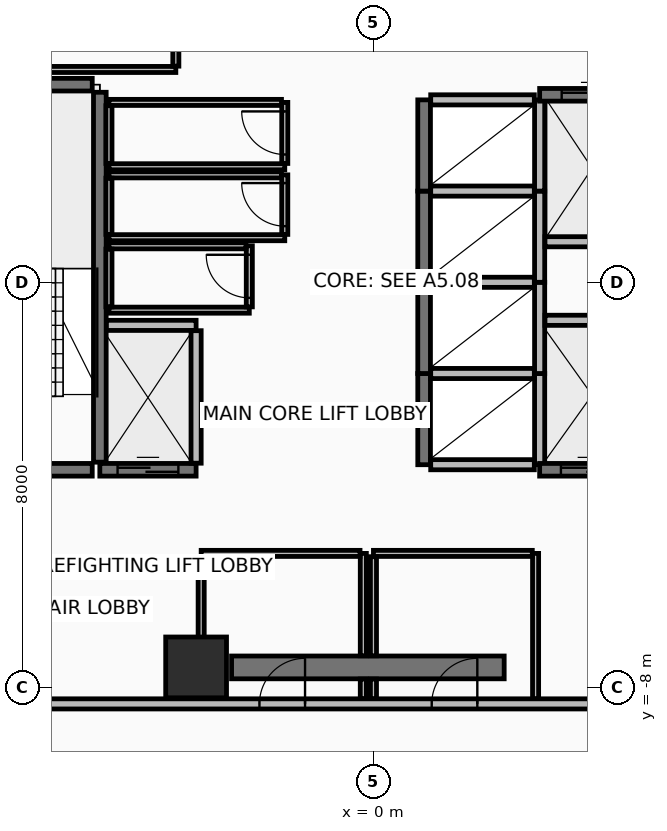
"""IFC4 building model, lengths in metres.
Left out: names, types, materials, properties, quantities, classifications, styles, units other than length and angle.
Written with IfcOpenShell. Run it as: python <this file> out.ifc"""

import sys

from ifc_helpers import new_model, si_unit, direction, frame, frame_2d, origin, origin_2d, place, context, subcontext, project, spatial, rectangle, extrude, element, fill, save


model = new_model("IFC4")
c1 = context("Model", 3, precision=1e-05, world=origin(), true_north=direction((0.0, 1.0)))
c2 = subcontext(c1, "Body", "Model", "MODEL_VIEW")
j1 = project(units=[si_unit("LENGTHUNIT", "METRE"), si_unit("PLANEANGLEUNIT", "RADIAN")], contexts=[c1])
p1 = place(None, origin())
s1 = spatial("IfcSite", under=j1, at=p1, CompositionType="ELEMENT")
p2 = place(p1, origin())
s2 = spatial("IfcBuilding", under=s1, at=p2, CompositionType="ELEMENT")
p3 = place(p2, frame((0.0, 0.0, 149.6)))
s3 = spatial("IfcBuildingStorey", under=s2, at=p3, CompositionType="ELEMENT", Elevation=149.6)
p4 = place(p3, frame((-3.5, -7.6, 0.0), z_axis=(0.0, 0.0, 1.0), x_axis=(1.0, 0.0, 0.0)))
e1 = element("IfcColumn", 1, at=p4, inside=s3, PredefinedType="COLUMN", context=c2, shape_type="SweptSolid", body=[
    extrude(rectangle(XDim=1.2, YDim=1.2, at=origin_2d()), origin(), (0.0, 0.0, 1.0), 3.6),
])
p5 = place(p3, frame((-2.8, -7.6, 0.0), z_axis=(0.0, 0.0, 1.0), x_axis=(1.0, 0.0, 0.0)))
e2 = element("IfcWall", 2, at=p5, inside=s3, PredefinedType="SHEAR", context=c2, shape_type="SweptSolid", body=[
    extrude(rectangle(XDim=5.38, YDim=0.45, at=frame_2d((2.69, 0.0))), origin(), (0.0, 0.0, 1.0), 3.41),
])
p6 = place(p3, frame((-9.62, -8.32, 0.0), z_axis=(0.0, 0.0, 1.0), x_axis=(1.0, 0.0, 0.0)))
e3 = element("IfcWall", 3, at=p6, inside=s3, PredefinedType="PARTITIONING", context=c2, shape_type="SweptSolid", body=[
    extrude(rectangle(XDim=19.24, YDim=0.2, at=frame_2d((9.62, 0.0))), origin(), (0.0, 0.0, 1.0), 2.855),
])
p7 = place(p6, frame((7.37, 0.0, 0.0)))
e4 = element("IfcOpeningElement", 4, at=p7, cuts=e3, PredefinedType="OPENING", context=c2, shape_type="SweptSolid", body=[
    extrude(rectangle(XDim=0.9, YDim=2.1, at=frame_2d((0.45, 1.05))), frame((0.0, 0.11, 0.0), z_axis=(0.0, -1.0, 0.0), x_axis=(1.0, 0.0, 0.0)), (0.0, 0.0, 1.0), 0.22),
])
p8 = place(p6, frame((10.77, 0.0, 0.0)))
e5 = element("IfcOpeningElement", 5, at=p8, cuts=e3, PredefinedType="OPENING", context=c2, shape_type="SweptSolid", body=[
    extrude(rectangle(XDim=0.9, YDim=2.1, at=frame_2d((0.45, 1.05))), frame((0.0, 0.11, 0.0), z_axis=(0.0, -1.0, 0.0), x_axis=(1.0, 0.0, 0.0)), (0.0, 0.0, 1.0), 0.22),
])
p9 = place(p3, frame((-5.4, -3.55, 0.0), z_axis=(0.0, 0.0, 1.0), x_axis=(0.0, 1.0, 0.0)))
e6 = element("IfcWall", 6, at=p9, inside=s3, PredefinedType="SHEAR", context=c2, shape_type="SweptSolid", body=[
    extrude(rectangle(XDim=7.3, YDim=0.25, at=frame_2d((3.65, 0.0))), origin(), (0.0, 0.0, 1.0), 3.41),
])
p10 = place(p3, frame((-8.5, -3.7, 0.0), z_axis=(0.0, 0.0, 1.0), x_axis=(1.0, 0.0, 0.0)))
e7 = element("IfcWall", 7, at=p10, inside=s3, PredefinedType="SHEAR", context=c2, shape_type="SweptSolid", body=[
    extrude(rectangle(XDim=2.95, YDim=0.25, at=frame_2d((1.475, 0.0))), origin(), (0.0, 0.0, 1.0), 3.41),
])
p11 = place(p10, frame((0.9, 0.0, 0.0)))
e8 = element("IfcOpeningElement", 8, at=p11, cuts=e7, PredefinedType="OPENING", context=c2, shape_type="SweptSolid", body=[
    extrude(rectangle(XDim=1.1, YDim=2.15, at=frame_2d((0.55, 1.075))), frame((0.0, 0.135, 0.0), z_axis=(0.0, -1.0, 0.0), x_axis=(1.0, 0.0, 0.0)), (0.0, 0.0, 1.0), 0.27),
])
p12 = place(p3, frame((-8.5, 3.9, 0.0), z_axis=(0.0, 0.0, 1.0), x_axis=(1.0, 0.0, 0.0)))
e9 = element("IfcWall", 9, at=p12, inside=s3, PredefinedType="SHEAR", context=c2, shape_type="SweptSolid", body=[
    extrude(rectangle(XDim=2.95, YDim=0.25, at=frame_2d((1.475, 0.0))), origin(), (0.0, 0.0, 1.0), 3.41),
])
p13 = place(p3, frame((1.0, -3.6, 0.0), z_axis=(0.0, 0.0, 1.0), x_axis=(0.0, 1.0, 0.0)))
e10 = element("IfcWall", 10, at=p13, inside=s3, PredefinedType="SHEAR", context=c2, shape_type="SweptSolid", body=[
    extrude(rectangle(XDim=1.8, YDim=0.25, at=frame_2d((0.9, 0.0))), origin(), (0.0, 0.0, 1.0), 3.41),
])
p14 = place(p3, frame((3.28, -3.6, 0.0), z_axis=(0.0, 0.0, 1.0), x_axis=(0.0, 1.0, 0.0)))
e11 = element("IfcWall", 11, at=p14, inside=s3, PredefinedType="PARTITIONING", context=c2, shape_type="SweptSolid", body=[
    extrude(rectangle(XDim=1.8, YDim=0.2, at=frame_2d((0.9, 0.0))), origin(), (0.0, 0.0, 1.0), 3.41),
])
for number, where, z_axis, x_axis in (
    (12, (1.13, -3.6, 0.0), (0.0, 0.0, 1.0), (1.0, 0.0, 0.0)),
    (13, (1.13, -1.8, 0.0), (0.0, 0.0, 1.0), (1.0, 0.0, 0.0)),
):
    element("IfcWall", number, at=place(p3, frame(where, z_axis=z_axis, x_axis=x_axis)), inside=s3, PredefinedType="PARTITIONING", context=c2, shape_type="SweptSolid", body=[
        extrude(rectangle(XDim=2.045, YDim=0.2, at=frame_2d((1.022, 0.0))), origin(), (0.0, 0.0, 1.0), 3.41),
    ])
p15 = place(p3, frame((1.0, -1.8, 0.0), z_axis=(0.0, 0.0, 1.0), x_axis=(0.0, 1.0, 0.0)))
e14 = element("IfcWall", 14, at=p15, inside=s3, PredefinedType="SHEAR", context=c2, shape_type="SweptSolid", body=[
    extrude(rectangle(XDim=1.8, YDim=0.25, at=frame_2d((0.9, 0.0))), origin(), (0.0, 0.0, 1.0), 3.41),
])
p16 = place(p3, frame((3.28, -1.8, 0.0), z_axis=(0.0, 0.0, 1.0), x_axis=(0.0, 1.0, 0.0)))
e15 = element("IfcWall", 15, at=p16, inside=s3, PredefinedType="PARTITIONING", context=c2, shape_type="SweptSolid", body=[
    extrude(rectangle(XDim=1.8, YDim=0.2, at=frame_2d((0.9, 0.0))), origin(), (0.0, 0.0, 1.0), 3.41),
])
p17 = place(p3, frame((1.13, 0.0, 0.0), z_axis=(0.0, 0.0, 1.0), x_axis=(1.0, 0.0, 0.0)))
e16 = element("IfcWall", 16, at=p17, inside=s3, PredefinedType="PARTITIONING", context=c2, shape_type="SweptSolid", body=[
    extrude(rectangle(XDim=2.045, YDim=0.2, at=frame_2d((1.022, 0.0))), origin(), (0.0, 0.0, 1.0), 3.41),
])
p18 = place(p3, frame((1.0, 0.0, 0.0), z_axis=(0.0, 0.0, 1.0), x_axis=(0.0, 1.0, 0.0)))
e17 = element("IfcWall", 17, at=p18, inside=s3, PredefinedType="SHEAR", context=c2, shape_type="SweptSolid", body=[
    extrude(rectangle(XDim=1.8, YDim=0.25, at=frame_2d((0.9, 0.0))), origin(), (0.0, 0.0, 1.0), 3.41),
])
p19 = place(p3, frame((3.28, 0.0, 0.0), z_axis=(0.0, 0.0, 1.0), x_axis=(0.0, 1.0, 0.0)))
e18 = element("IfcWall", 18, at=p19, inside=s3, PredefinedType="PARTITIONING", context=c2, shape_type="SweptSolid", body=[
    extrude(rectangle(XDim=1.8, YDim=0.2, at=frame_2d((0.9, 0.0))), origin(), (0.0, 0.0, 1.0), 3.41),
])
p20 = place(p3, frame((1.13, 1.8, 0.0), z_axis=(0.0, 0.0, 1.0), x_axis=(1.0, 0.0, 0.0)))
e19 = element("IfcWall", 19, at=p20, inside=s3, PredefinedType="PARTITIONING", context=c2, shape_type="SweptSolid", body=[
    extrude(rectangle(XDim=2.045, YDim=0.2, at=frame_2d((1.022, 0.0))), origin(), (0.0, 0.0, 1.0), 3.41),
])
p21 = place(p3, frame((1.0, 1.8, 0.0), z_axis=(0.0, 0.0, 1.0), x_axis=(0.0, 1.0, 0.0)))
e20 = element("IfcWall", 20, at=p21, inside=s3, PredefinedType="SHEAR", context=c2, shape_type="SweptSolid", body=[
    extrude(rectangle(XDim=1.8, YDim=0.25, at=frame_2d((0.9, 0.0))), origin(), (0.0, 0.0, 1.0), 3.41),
])
p22 = place(p3, frame((3.28, 1.8, 0.0), z_axis=(0.0, 0.0, 1.0), x_axis=(0.0, 1.0, 0.0)))
e21 = element("IfcWall", 21, at=p22, inside=s3, PredefinedType="PARTITIONING", context=c2, shape_type="SweptSolid", body=[
    extrude(rectangle(XDim=1.8, YDim=0.2, at=frame_2d((0.9, 0.0))), origin(), (0.0, 0.0, 1.0), 3.41),
])
p23 = place(p3, frame((1.13, 3.6, 0.0), z_axis=(0.0, 0.0, 1.0), x_axis=(1.0, 0.0, 0.0)))
e22 = element("IfcWall", 22, at=p23, inside=s3, PredefinedType="PARTITIONING", context=c2, shape_type="SweptSolid", body=[
    extrude(rectangle(XDim=2.045, YDim=0.2, at=frame_2d((1.022, 0.0))), origin(), (0.0, 0.0, 1.0), 2.605),
])
p24 = place(p3, frame((-5.4, -3.7, 0.0), z_axis=(0.0, 0.0, 1.0), x_axis=(1.0, 0.0, 0.0)))
e23 = element("IfcWall", 23, at=p24, inside=s3, PredefinedType="SHEAR", context=c2, shape_type="SweptSolid", body=[
    extrude(rectangle(XDim=1.9, YDim=0.25, at=frame_2d((0.95, 0.0))), origin(), (0.0, 0.0, 1.0), 3.41),
])
p25 = place(p24, frame((0.35, 0.0, 0.0)))
e24 = element("IfcOpeningElement", 24, at=p25, cuts=e23, PredefinedType="OPENING", context=c2, shape_type="SweptSolid", body=[
    extrude(rectangle(XDim=1.2, YDim=2.2, at=frame_2d((0.6, 1.1))), frame((0.0, 0.135, 0.0), z_axis=(0.0, -1.0, 0.0), x_axis=(1.0, 0.0, 0.0)), (0.0, 0.0, 1.0), 0.27),
])
p26 = place(p3, frame((-5.27, -0.85, 0.0), z_axis=(0.0, 0.0, 1.0), x_axis=(1.0, 0.0, 0.0)))
e25 = element("IfcWall", 25, at=p26, inside=s3, PredefinedType="PARTITIONING", context=c2, shape_type="SweptSolid", body=[
    extrude(rectangle(XDim=1.77, YDim=0.2, at=frame_2d((0.885, 0.0))), origin(), (0.0, 0.0, 1.0), 3.41),
])
p27 = place(p3, frame((-3.5, -3.57, 0.0), z_axis=(0.0, 0.0, 1.0), x_axis=(0.0, 1.0, 0.0)))
e26 = element("IfcWall", 26, at=p27, inside=s3, PredefinedType="PARTITIONING", context=c2, shape_type="SweptSolid", body=[
    extrude(rectangle(XDim=2.615, YDim=0.2, at=frame_2d((1.308, 0.0))), origin(), (0.0, 0.0, 1.0), 3.41),
])
p28 = place(p3, frame((3.28, 3.7, 0.0), z_axis=(0.0, 0.0, 1.0), x_axis=(1.0, 0.0, 0.0)))
e27 = element("IfcWall", 27, at=p28, inside=s3, PredefinedType="SHEAR", context=c2, shape_type="SweptSolid", body=[
    extrude(rectangle(XDim=2.07, YDim=0.25, at=frame_2d((1.035, 0.0))), origin(), (0.0, 0.0, 1.0), 3.41),
])
p29 = place(p28, frame((0.435, 0.0, 0.0)))
e28 = element("IfcOpeningElement", 28, at=p29, cuts=e27, PredefinedType="OPENING", context=c2, shape_type="SweptSolid", body=[
    extrude(rectangle(XDim=1.2, YDim=2.2, at=frame_2d((0.6, 1.1))), frame((0.0, 0.135, 0.0), z_axis=(0.0, -1.0, 0.0), x_axis=(1.0, 0.0, 0.0)), (0.0, 0.0, 1.0), 0.27),
])
p30 = place(p3, frame((3.385, 0.8, 0.0), z_axis=(0.0, 0.0, 1.0), x_axis=(1.0, 0.0, 0.0)))
e29 = element("IfcWall", 29, at=p30, inside=s3, PredefinedType="PARTITIONING", context=c2, shape_type="SweptSolid", body=[
    extrude(rectangle(XDim=1.835, YDim=0.2, at=frame_2d((0.917, 0.0))), origin(), (0.0, 0.0, 1.0), 3.41),
])
p31 = place(p3, frame((3.28, -3.7, 0.0), z_axis=(0.0, 0.0, 1.0), x_axis=(1.0, 0.0, 0.0)))
e30 = element("IfcWall", 30, at=p31, inside=s3, PredefinedType="SHEAR", context=c2, shape_type="SweptSolid", body=[
    extrude(rectangle(XDim=1.94, YDim=0.25, at=frame_2d((0.97, 0.0))), origin(), (0.0, 0.0, 1.0), 3.41),
])
p32 = place(p31, frame((0.42, 0.0, 0.0)))
e31 = element("IfcOpeningElement", 31, at=p32, cuts=e30, PredefinedType="OPENING", context=c2, shape_type="SweptSolid", body=[
    extrude(rectangle(XDim=1.1, YDim=2.2, at=frame_2d((0.55, 1.1))), frame((0.0, 0.135, 0.0), z_axis=(0.0, -1.0, 0.0), x_axis=(1.0, 0.0, 0.0)), (0.0, 0.0, 1.0), 0.27),
])
p33 = place(p3, frame((3.385, -0.75, 0.0), z_axis=(0.0, 0.0, 1.0), x_axis=(1.0, 0.0, 0.0)))
e32 = element("IfcWall", 32, at=p33, inside=s3, PredefinedType="PARTITIONING", context=c2, shape_type="SweptSolid", body=[
    extrude(rectangle(XDim=1.835, YDim=0.2, at=frame_2d((0.917, 0.0))), origin(), (0.0, 0.0, 1.0), 3.41),
])
p34 = place(p3, frame((-5.22, 2.28, 0.0), z_axis=(0.0, 0.0, 1.0), x_axis=(1.0, 0.0, 0.0)))
e33 = element("IfcWall", 33, at=p34, inside=s3, PredefinedType="PARTITIONING", context=c2, shape_type="SweptSolid", body=[
    extrude(rectangle(XDim=3.47, YDim=0.12, at=frame_2d((1.735, 0.0))), origin(), (0.0, 0.0, 1.0), 3.41),
])
p35 = place(p3, frame((-1.75, 2.345, 0.0), z_axis=(0.0, 0.0, 1.0), x_axis=(0.0, 1.0, 0.0)))
e34 = element("IfcWall", 34, at=p35, inside=s3, PredefinedType="PARTITIONING", context=c2, shape_type="SweptSolid", body=[
    extrude(rectangle(XDim=1.205, YDim=0.12, at=frame_2d((0.603, 0.0))), origin(), (0.0, 0.0, 1.0), 3.41),
])
p36 = place(p35, frame((0.177, 0.0, 0.0)))
e35 = element("IfcOpeningElement", 35, at=p36, cuts=e34, PredefinedType="OPENING", context=c2, shape_type="SweptSolid", body=[
    extrude(rectangle(XDim=0.85, YDim=2.1, at=frame_2d((0.425, 1.05))), frame((0.0, 0.07, 0.0), z_axis=(0.0, -1.0, 0.0), x_axis=(1.0, 0.0, 0.0)), (0.0, 0.0, 1.0), 0.14),
])
p37 = place(p3, frame((-1.815, 3.55, 0.0), z_axis=(0.0, 0.0, 1.0), x_axis=(-1.0, 0.0, 0.0)))
e36 = element("IfcWall", 36, at=p37, inside=s3, PredefinedType="PARTITIONING", context=c2, shape_type="SweptSolid", body=[
    extrude(rectangle(XDim=3.405, YDim=0.12, at=frame_2d((1.703, 0.0))), origin(), (0.0, 0.0, 1.0), 3.41),
])
p38 = place(p3, frame((-5.22, 3.485, 0.0), z_axis=(0.0, 0.0, 1.0), x_axis=(0.0, -1.0, 0.0)))
e37 = element("IfcWall", 37, at=p38, inside=s3, PredefinedType="PARTITIONING", context=c2, shape_type="SweptSolid", body=[
    extrude(rectangle(XDim=1.14, YDim=0.12, at=frame_2d((0.57, 0.0))), origin(), (0.0, 0.0, 1.0), 3.41),
])
p39 = place(p3, frame((-5.22, 0.88, 0.0), z_axis=(0.0, 0.0, 1.0), x_axis=(1.0, 0.0, 0.0)))
e38 = element("IfcWall", 38, at=p39, inside=s3, PredefinedType="PARTITIONING", context=c2, shape_type="SweptSolid", body=[
    extrude(rectangle(XDim=3.47, YDim=0.12, at=frame_2d((1.735, 0.0))), origin(), (0.0, 0.0, 1.0), 3.41),
])
p40 = place(p3, frame((-1.75, 0.945, 0.0), z_axis=(0.0, 0.0, 1.0), x_axis=(0.0, 1.0, 0.0)))
e39 = element("IfcWall", 39, at=p40, inside=s3, PredefinedType="PARTITIONING", context=c2, shape_type="SweptSolid", body=[
    extrude(rectangle(XDim=1.175, YDim=0.12, at=frame_2d((0.587, 0.0))), origin(), (0.0, 0.0, 1.0), 3.41),
])
p41 = place(p40, frame((0.163, 0.0, 0.0)))
e40 = element("IfcOpeningElement", 40, at=p41, cuts=e39, PredefinedType="OPENING", context=c2, shape_type="SweptSolid", body=[
    extrude(rectangle(XDim=0.85, YDim=2.1, at=frame_2d((0.425, 1.05))), frame((0.0, 0.07, 0.0), z_axis=(0.0, -1.0, 0.0), x_axis=(1.0, 0.0, 0.0)), (0.0, 0.0, 1.0), 0.14),
])
p42 = place(p3, frame((-1.815, 2.12, 0.0), z_axis=(0.0, 0.0, 1.0), x_axis=(-1.0, 0.0, 0.0)))
e41 = element("IfcWall", 41, at=p42, inside=s3, PredefinedType="PARTITIONING", context=c2, shape_type="SweptSolid", body=[
    extrude(rectangle(XDim=3.405, YDim=0.12, at=frame_2d((1.703, 0.0))), origin(), (0.0, 0.0, 1.0), 3.41),
])
p43 = place(p3, frame((-5.22, 2.055, 0.0), z_axis=(0.0, 0.0, 1.0), x_axis=(0.0, -1.0, 0.0)))
e42 = element("IfcWall", 42, at=p43, inside=s3, PredefinedType="PARTITIONING", context=c2, shape_type="SweptSolid", body=[
    extrude(rectangle(XDim=1.11, YDim=0.12, at=frame_2d((0.555, 0.0))), origin(), (0.0, 0.0, 1.0), 3.41),
])
p44 = place(p3, frame((-5.22, -0.55, 0.0), z_axis=(0.0, 0.0, 1.0), x_axis=(1.0, 0.0, 0.0)))
e43 = element("IfcWall", 43, at=p44, inside=s3, PredefinedType="PARTITIONING", context=c2, shape_type="SweptSolid", body=[
    extrude(rectangle(XDim=2.77, YDim=0.12, at=frame_2d((1.385, 0.0))), origin(), (0.0, 0.0, 1.0), 3.41),
])
p45 = place(p3, frame((-2.45, -0.485, 0.0), z_axis=(0.0, 0.0, 1.0), x_axis=(0.0, 1.0, 0.0)))
e44 = element("IfcWall", 44, at=p45, inside=s3, PredefinedType="PARTITIONING", context=c2, shape_type="SweptSolid", body=[
    extrude(rectangle(XDim=1.205, YDim=0.12, at=frame_2d((0.603, 0.0))), origin(), (0.0, 0.0, 1.0), 3.41),
])
p46 = place(p45, frame((0.178, 0.0, 0.0)))
e45 = element("IfcOpeningElement", 45, at=p46, cuts=e44, PredefinedType="OPENING", context=c2, shape_type="SweptSolid", body=[
    extrude(rectangle(XDim=0.85, YDim=2.1, at=frame_2d((0.425, 1.05))), frame((0.0, 0.07, 0.0), z_axis=(0.0, -1.0, 0.0), x_axis=(1.0, 0.0, 0.0)), (0.0, 0.0, 1.0), 0.14),
])
p47 = place(p3, frame((-2.515, 0.72, 0.0), z_axis=(0.0, 0.0, 1.0), x_axis=(-1.0, 0.0, 0.0)))
e46 = element("IfcWall", 46, at=p47, inside=s3, PredefinedType="PARTITIONING", context=c2, shape_type="SweptSolid", body=[
    extrude(rectangle(XDim=2.705, YDim=0.12, at=frame_2d((1.353, 0.0))), origin(), (0.0, 0.0, 1.0), 3.41),
])
p48 = place(p3, frame((-5.22, 0.655, 0.0), z_axis=(0.0, 0.0, 1.0), x_axis=(0.0, -1.0, 0.0)))
e47 = element("IfcWall", 47, at=p48, inside=s3, PredefinedType="PARTITIONING", context=c2, shape_type="SweptSolid", body=[
    extrude(rectangle(XDim=1.14, YDim=0.12, at=frame_2d((0.57, 0.0))), origin(), (0.0, 0.0, 1.0), 3.41),
])
p49 = place(p3, frame((-0.2, -8.215, 0.0), z_axis=(0.0, 0.0, 1.0), x_axis=(0.0, 1.0, 0.0)))
e48 = element("IfcWall", 48, at=p49, inside=s3, PredefinedType="PARTITIONING", context=c2, shape_type="SweptSolid", body=[
    extrude(rectangle(XDim=0.385, YDim=0.12, at=frame_2d((0.192, 0.0))), origin(), (0.0, 0.0, 1.0), 2.605),
])
p50 = place(p3, frame((-0.2, -7.37, 0.0), z_axis=(0.0, 0.0, 1.0), x_axis=(0.0, 1.0, 0.0)))
e49 = element("IfcWall", 49, at=p50, inside=s3, PredefinedType="PARTITIONING", context=c2, shape_type="SweptSolid", body=[
    extrude(rectangle(XDim=2.02, YDim=0.12, at=frame_2d((1.01, 0.0))), origin(), (0.0, 0.0, 1.0), 2.605),
])
p51 = place(p3, frame((-0.265, -5.35, 0.0), z_axis=(0.0, 0.0, 1.0), x_axis=(-1.0, 0.0, 0.0)))
e50 = element("IfcWall", 50, at=p51, inside=s3, PredefinedType="PARTITIONING", context=c2, shape_type="SweptSolid", body=[
    extrude(rectangle(XDim=3.135, YDim=0.12, at=frame_2d((1.567, 0.0))), origin(), (0.0, 0.0, 1.0), 2.605),
])
p52 = place(p3, frame((-3.4, -5.415, 0.0), z_axis=(0.0, 0.0, 1.0), x_axis=(0.0, -1.0, 0.0)))
e51 = element("IfcWall", 51, at=p52, inside=s3, PredefinedType="PARTITIONING", context=c2, shape_type="SweptSolid", body=[
    extrude(rectangle(XDim=2.8, YDim=0.12, at=frame_2d((1.4, 0.0))), origin(), (0.0, 0.0, 1.0), 2.605),
])
p53 = place(p3, frame((3.2, -8.215, 0.0), z_axis=(0.0, 0.0, 1.0), x_axis=(0.0, 1.0, 0.0)))
e52 = element("IfcWall", 52, at=p53, inside=s3, PredefinedType="PARTITIONING", context=c2, shape_type="SweptSolid", body=[
    extrude(rectangle(XDim=2.865, YDim=0.12, at=frame_2d((1.433, 0.0))), origin(), (0.0, 0.0, 1.0), 2.605),
])
p54 = place(p3, frame((3.135, -5.35, 0.0), z_axis=(0.0, 0.0, 1.0), x_axis=(-1.0, 0.0, 0.0)))
e53 = element("IfcWall", 53, at=p54, inside=s3, PredefinedType="PARTITIONING", context=c2, shape_type="SweptSolid", body=[
    extrude(rectangle(XDim=3.135, YDim=0.12, at=frame_2d((1.567, 0.0))), origin(), (0.0, 0.0, 1.0), 3.41),
])
p55 = place(p3, frame((0.0, -5.415, 0.0), z_axis=(0.0, 0.0, 1.0), x_axis=(0.0, -1.0, 0.0)))
e54 = element("IfcWall", 54, at=p55, inside=s3, PredefinedType="PARTITIONING", context=c2, shape_type="SweptSolid", body=[
    extrude(rectangle(XDim=1.955, YDim=0.12, at=frame_2d((0.978, 0.0))), origin(), (0.0, 0.0, 1.0), 2.605),
])
p56 = place(p3, frame((0.0, -7.83, 0.0), z_axis=(0.0, 0.0, 1.0), x_axis=(0.0, -1.0, 0.0)))
e55 = element("IfcWall", 55, at=p56, inside=s3, PredefinedType="PARTITIONING", context=c2, shape_type="SweptSolid", body=[
    extrude(rectangle(XDim=0.385, YDim=0.12, at=frame_2d((0.192, 0.0))), origin(), (0.0, 0.0, 1.0), 2.605),
])
p57 = place(p3, frame((-7.8, 4.2, 0.0), z_axis=(0.0, 0.0, 1.0), x_axis=(1.0, 0.0, 0.0)))
e56 = element("IfcWall", 56, at=p57, inside=s3, PredefinedType="PARTITIONING", context=c2, shape_type="SweptSolid", body=[
    extrude(rectangle(XDim=3.9, YDim=0.12, at=frame_2d((1.95, 0.0))), origin(), (0.0, 0.0, 1.0), 3.41),
])
p58 = place(p3, frame((-3.9, 4.265, 0.0), z_axis=(0.0, 0.0, 1.0), x_axis=(0.0, 1.0, 0.0)))
e57 = element("IfcWall", 57, at=p58, inside=s3, PredefinedType="PARTITIONING", context=c2, shape_type="SweptSolid", body=[
    extrude(rectangle(XDim=3.95, YDim=0.12, at=frame_2d((1.975, 0.0))), origin(), (0.0, 0.0, 1.0), 2.605),
])
p59 = place(p25, origin())
e58 = element("IfcDoor", 58, at=p59, inside=s3, OperationType="SLIDING_TO_RIGHT", PredefinedType="DOOR", context=c2, shape_type="SweptSolid", body=[
    extrude(rectangle(XDim=1.2, YDim=2.2, at=frame_2d((0.6, 1.1))), frame((0.0, 0.025, 0.0), z_axis=(0.0, -1.0, 0.0), x_axis=(1.0, 0.0, 0.0)), (0.0, 0.0, 1.0), 0.05),
])
fill(e24, e58)
p60 = place(p29, origin())
e59 = element("IfcDoor", 59, at=p60, inside=s3, OperationType="SLIDING_TO_RIGHT", PredefinedType="DOOR", context=c2, shape_type="SweptSolid", body=[
    extrude(rectangle(XDim=1.2, YDim=2.2, at=frame_2d((0.6, 1.1))), frame((0.0, 0.025, 0.0), z_axis=(0.0, -1.0, 0.0), x_axis=(1.0, 0.0, 0.0)), (0.0, 0.0, 1.0), 0.05),
])
fill(e28, e59)
p61 = place(p32, origin())
e60 = element("IfcDoor", 60, at=p61, inside=s3, OperationType="SLIDING_TO_LEFT", PredefinedType="DOOR", context=c2, shape_type="SweptSolid", body=[
    extrude(rectangle(XDim=1.1, YDim=2.2, at=frame_2d((0.55, 1.1))), frame((0.0, 0.025, 0.0), z_axis=(0.0, -1.0, 0.0), x_axis=(1.0, 0.0, 0.0)), (0.0, 0.0, 1.0), 0.05),
])
fill(e31, e60)
p62 = place(p36, frame((0.85, 0.0, 0.0), z_axis=(0.0, 0.0, 1.0), x_axis=(-1.0, 0.0, 0.0)))
e61 = element("IfcDoor", 61, at=p62, inside=s3, OperationType="SINGLE_SWING_RIGHT", PredefinedType="DOOR", context=c2, shape_type="SweptSolid", body=[
    extrude(rectangle(XDim=0.85, YDim=2.1, at=frame_2d((0.425, 1.05))), frame((0.0, 0.025, 0.0), z_axis=(0.0, -1.0, 0.0), x_axis=(1.0, 0.0, 0.0)), (0.0, 0.0, 1.0), 0.05),
])
fill(e35, e61)
p63 = place(p41, frame((0.85, 0.0, 0.0), z_axis=(0.0, 0.0, 1.0), x_axis=(-1.0, 0.0, 0.0)))
e62 = element("IfcDoor", 62, at=p63, inside=s3, OperationType="SINGLE_SWING_RIGHT", PredefinedType="DOOR", context=c2, shape_type="SweptSolid", body=[
    extrude(rectangle(XDim=0.85, YDim=2.1, at=frame_2d((0.425, 1.05))), frame((0.0, 0.025, 0.0), z_axis=(0.0, -1.0, 0.0), x_axis=(1.0, 0.0, 0.0)), (0.0, 0.0, 1.0), 0.05),
])
fill(e40, e62)
p64 = place(p46, frame((0.85, 0.0, 0.0), z_axis=(0.0, 0.0, 1.0), x_axis=(-1.0, 0.0, 0.0)))
e63 = element("IfcDoor", 63, at=p64, inside=s3, OperationType="SINGLE_SWING_RIGHT", PredefinedType="DOOR", context=c2, shape_type="SweptSolid", body=[
    extrude(rectangle(XDim=0.85, YDim=2.1, at=frame_2d((0.425, 1.05))), frame((0.0, 0.025, 0.0), z_axis=(0.0, -1.0, 0.0), x_axis=(1.0, 0.0, 0.0)), (0.0, 0.0, 1.0), 0.05),
])
fill(e45, e63)
p65 = place(p7, frame((0.9, 0.0, 0.0), z_axis=(0.0, 0.0, 1.0), x_axis=(-1.0, 0.0, 0.0)))
e64 = element("IfcDoor", 64, at=p65, inside=s3, OperationType="SINGLE_SWING_LEFT", PredefinedType="DOOR", context=c2, shape_type="SweptSolid", body=[
    extrude(rectangle(XDim=0.9, YDim=2.1, at=frame_2d((0.45, 1.05))), frame((0.0, 0.025, 0.0), z_axis=(0.0, -1.0, 0.0), x_axis=(1.0, 0.0, 0.0)), (0.0, 0.0, 1.0), 0.05),
])
fill(e4, e64)
p66 = place(p8, frame((0.9, 0.0, 0.0), z_axis=(0.0, 0.0, 1.0), x_axis=(-1.0, 0.0, 0.0)))
e65 = element("IfcDoor", 65, at=p66, inside=s3, OperationType="SINGLE_SWING_LEFT", PredefinedType="DOOR", context=c2, shape_type="SweptSolid", body=[
    extrude(rectangle(XDim=0.9, YDim=2.1, at=frame_2d((0.45, 1.05))), frame((0.0, 0.025, 0.0), z_axis=(0.0, -1.0, 0.0), x_axis=(1.0, 0.0, 0.0)), (0.0, 0.0, 1.0), 0.05),
])
fill(e5, e65)
save(model, sys.argv[1])
